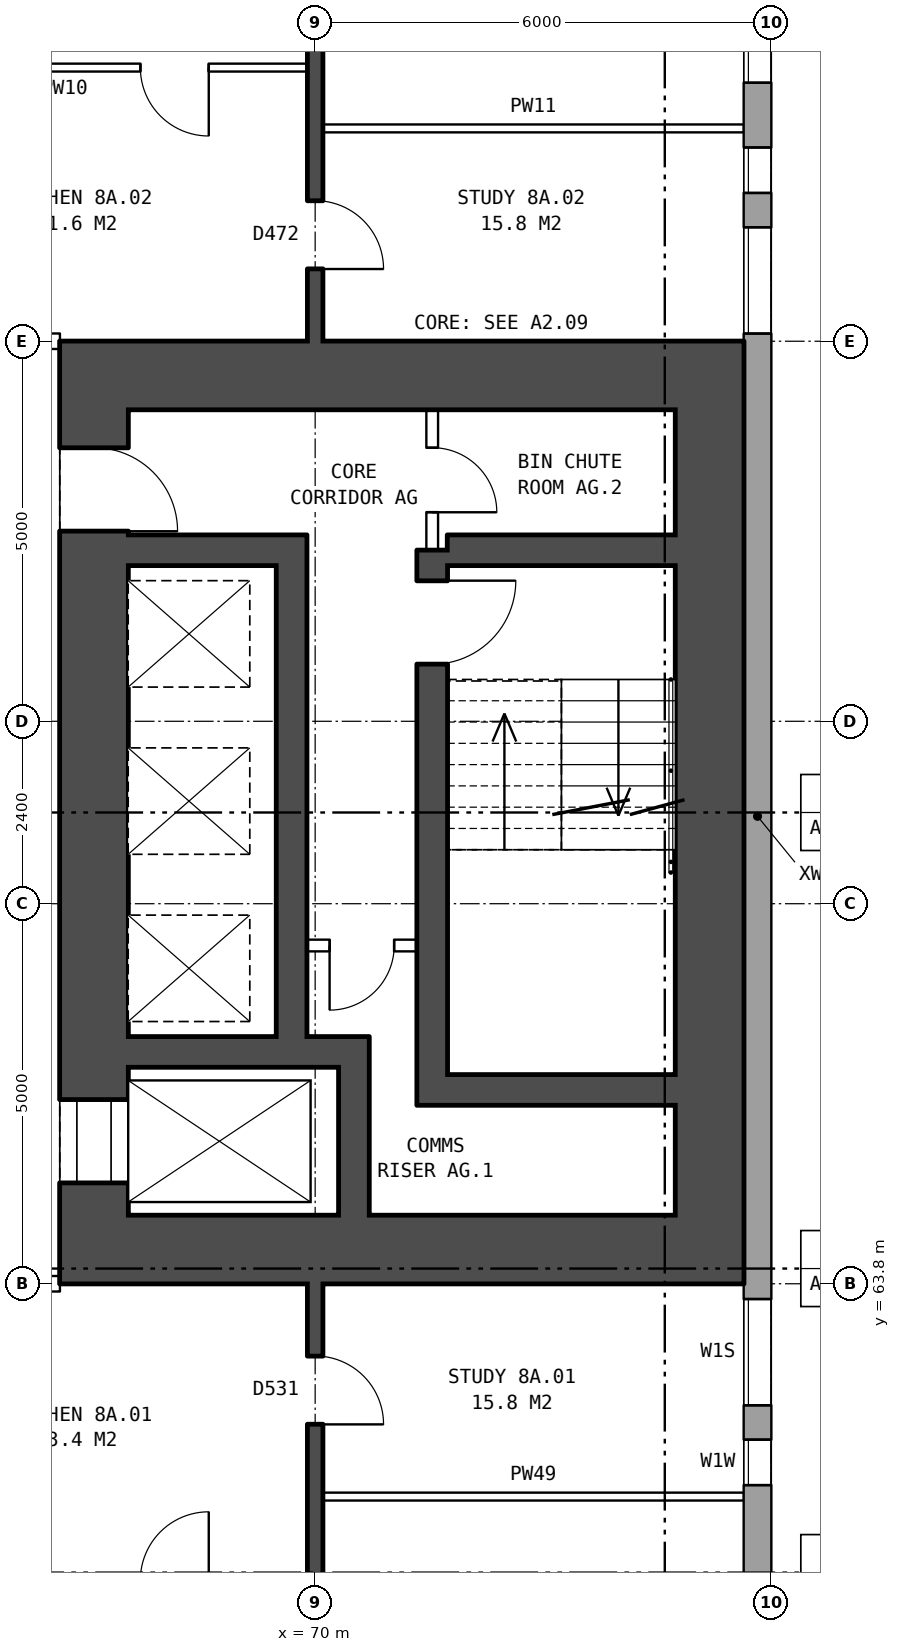
"""IFC4 building model, lengths in metres.
Left out: names, types, materials, properties, quantities, classifications, styles, units other than length and angle.
Written with IfcOpenShell. Run it as: python <this file> out.ifc"""

import sys

from ifc_helpers import new_model, si_unit, direction, frame, frame_2d, origin, place, context, subcontext, project, spatial, rectangle, extrude, element, fill, save


model = new_model("IFC4")
c1 = context("Model", 3, precision=1e-05, world=origin(), true_north=direction((0.0, 1.0)))
c2 = subcontext(c1, "Body", "Model", "MODEL_VIEW")
j1 = project(units=[si_unit("LENGTHUNIT", "METRE"), si_unit("PLANEANGLEUNIT", "RADIAN")], contexts=[c1])
p1 = place(None, origin())
s1 = spatial("IfcSite", under=j1, at=p1, CompositionType="ELEMENT")
p2 = place(p1, origin())
s2 = spatial("IfcBuilding", under=s1, at=p2, CompositionType="ELEMENT")
p3 = place(p2, frame((0.0, 0.0, 31.9)))
s3 = spatial("IfcBuildingStorey", under=s2, at=p3, CompositionType="ELEMENT", Elevation=31.9)
p4 = place(p3, frame((75.82, 57.075, 0.0), z_axis=(0.0, 0.0, 1.0), x_axis=(0.0, 1.0, 0.0)))
e1 = element("IfcWall", 1, at=p4, inside=s3, PredefinedType="STANDARD", context=c2, shape_type="SweptSolid", body=[
    extrude(rectangle(XDim=25.851, YDim=0.36, at=frame_2d((12.925, 0.0))), origin(), (0.0, 0.0, 1.0), 2.85),
])
p5 = place(p4, frame((0.3, 0.0, 0.8)))
e2 = element("IfcOpeningElement", 2, at=p5, cuts=e1, PredefinedType="OPENING", context=c2, shape_type="SweptSolid", body=[
    extrude(rectangle(XDim=1.4, YDim=1.8, at=frame_2d((0.7, 0.9))), frame((0.0, 0.19, 0.0), z_axis=(0.0, -1.0, 0.0), x_axis=(1.0, 0.0, 0.0)), (0.0, 0.0, 1.0), 0.38),
])
p6 = place(p4, frame((4.075, 0.0, 0.25)))
e3 = element("IfcOpeningElement", 3, at=p6, cuts=e1, PredefinedType="OPENING", context=c2, shape_type="SweptSolid", body=[
    extrude(rectangle(XDim=0.6, YDim=0.9, at=frame_2d((0.3, 0.45))), frame((0.0, 0.19, 0.0), z_axis=(0.0, -1.0, 0.0), x_axis=(1.0, 0.0, 0.0)), (0.0, 0.0, 1.0), 0.38),
])
p7 = place(p4, frame((19.225, 0.0, 1.65)))
e4 = element("IfcOpeningElement", 4, at=p7, cuts=e1, PredefinedType="OPENING", context=c2, shape_type="SweptSolid", body=[
    extrude(rectangle(XDim=1.4, YDim=0.9, at=frame_2d((0.7, 0.45))), frame((0.0, 0.19, 0.0), z_axis=(0.0, -1.0, 0.0), x_axis=(1.0, 0.0, 0.0)), (0.0, 0.0, 1.0), 0.38),
])
p8 = place(p4, frame((22.525, 0.0, 0.8)))
e5 = element("IfcOpeningElement", 5, at=p8, cuts=e1, PredefinedType="OPENING", context=c2, shape_type="SweptSolid", body=[
    extrude(rectangle(XDim=1.0, YDim=1.2, at=frame_2d((0.5, 0.6))), frame((0.0, 0.19, 0.0), z_axis=(0.0, -1.0, 0.0), x_axis=(1.0, 0.0, 0.0)), (0.0, 0.0, 1.0), 0.38),
])
p9 = place(p4, frame((2.0, 0.0, 0.8)))
e6 = element("IfcOpeningElement", 6, at=p9, cuts=e1, PredefinedType="OPENING", context=c2, shape_type="SweptSolid", body=[
    extrude(rectangle(XDim=0.8, YDim=1.5, at=frame_2d((0.4, 0.75))), frame((0.0, 0.19, 0.0), z_axis=(0.0, -1.0, 0.0), x_axis=(1.0, 0.0, 0.0)), (0.0, 0.0, 1.0), 0.38),
])
p10 = place(p4, frame((5.125, 0.0, 1.65)))
e7 = element("IfcOpeningElement", 7, at=p10, cuts=e1, PredefinedType="OPENING", context=c2, shape_type="SweptSolid", body=[
    extrude(rectangle(XDim=1.4, YDim=0.9, at=frame_2d((0.7, 0.45))), frame((0.0, 0.19, 0.0), z_axis=(0.0, -1.0, 0.0), x_axis=(1.0, 0.0, 0.0)), (0.0, 0.0, 1.0), 0.38),
])
p11 = place(p4, frame((21.075, 0.0, 0.25)))
e8 = element("IfcOpeningElement", 8, at=p11, cuts=e1, PredefinedType="OPENING", context=c2, shape_type="SweptSolid", body=[
    extrude(rectangle(XDim=0.6, YDim=0.9, at=frame_2d((0.3, 0.45))), frame((0.0, 0.19, 0.0), z_axis=(0.0, -1.0, 0.0), x_axis=(1.0, 0.0, 0.0)), (0.0, 0.0, 1.0), 0.38),
])
p12 = place(p4, frame((23.825, 0.0, 0.8)))
e9 = element("IfcOpeningElement", 9, at=p12, cuts=e1, PredefinedType="OPENING", context=c2, shape_type="SweptSolid", body=[
    extrude(rectangle(XDim=1.4, YDim=1.8, at=frame_2d((0.7, 0.9))), frame((0.0, 0.19, 0.0), z_axis=(0.0, -1.0, 0.0), x_axis=(1.0, 0.0, 0.0)), (0.0, 0.0, 1.0), 0.38),
])
p13 = place(p3, frame((67.09, 64.7, 0.0), z_axis=(0.0, 0.0, 1.0), x_axis=(0.0, 1.0, 0.0)))
e10 = element("IfcWall", 10, at=p13, inside=s3, PredefinedType="SHEAR", context=c2, shape_type="SweptSolid", body=[
    extrude(rectangle(XDim=10.6, YDim=0.9, at=frame_2d((5.3, 0.0))), origin(), (0.0, 0.0, 1.0), 2.85),
])
p14 = place(p13, frame((0.425, 0.0, 0.0)))
e11 = element("IfcOpeningElement", 11, at=p14, cuts=e10, PredefinedType="OPENING", context=c2, shape_type="SweptSolid", body=[
    extrude(rectangle(XDim=1.1, YDim=2.1, at=frame_2d((0.55, 1.05))), frame((0.0, 0.46, 0.0), z_axis=(0.0, -1.0, 0.0), x_axis=(1.0, 0.0, 0.0)), (0.0, 0.0, 1.0), 0.92),
])
p15 = place(p13, frame((9.0, 0.0, 0.0)))
e12 = element("IfcOpeningElement", 12, at=p15, cuts=e10, PredefinedType="OPENING", context=c2, shape_type="SweptSolid", body=[
    extrude(rectangle(XDim=1.1, YDim=2.1, at=frame_2d((0.55, 1.05))), frame((0.0, 0.46, 0.0), z_axis=(0.0, -1.0, 0.0), x_axis=(1.0, 0.0, 0.0)), (0.0, 0.0, 1.0), 0.92),
])
p16 = place(p3, frame((75.19, 64.7, 0.0), z_axis=(0.0, 0.0, 1.0), x_axis=(0.0, 1.0, 0.0)))
e13 = element("IfcWall", 13, at=p16, inside=s3, PredefinedType="SHEAR", context=c2, shape_type="SweptSolid", body=[
    extrude(rectangle(XDim=10.6, YDim=0.9, at=frame_2d((5.3, 0.0))), origin(), (0.0, 0.0, 1.0), 2.85),
])
for number, where, z_axis, x_axis in (
    (14, (66.64, 64.25, 0.0), (0.0, 0.0, 1.0), (1.0, 0.0, 0.0)),
    (15, (66.64, 75.75, 0.0), (0.0, 0.0, 1.0), (1.0, 0.0, 0.0)),
):
    element("IfcWall", number, at=place(p3, frame(where, z_axis=z_axis, x_axis=x_axis)), inside=s3, PredefinedType="SHEAR", context=c2, shape_type="SweptSolid", body=[
        extrude(rectangle(XDim=9.0, YDim=0.9, at=frame_2d((4.5, 0.0))), origin(), (0.0, 0.0, 1.0), 2.85),
    ])
p17 = place(p3, frame((71.74, 66.35, 0.0), z_axis=(0.0, 0.0, 1.0), x_axis=(1.0, 0.0, 0.0)))
e16 = element("IfcWall", 16, at=p17, inside=s3, PredefinedType="SHEAR", context=c2, shape_type="SweptSolid", body=[
    extrude(rectangle(XDim=3.0, YDim=0.4, at=frame_2d((1.5, 0.0))), origin(), (0.0, 0.0, 1.0), 2.85),
])
p18 = place(p3, frame((67.54, 66.85, 0.0), z_axis=(0.0, 0.0, 1.0), x_axis=(1.0, 0.0, 0.0)))
e17 = element("IfcWall", 17, at=p18, inside=s3, PredefinedType="SHEAR", context=c2, shape_type="SweptSolid", body=[
    extrude(rectangle(XDim=3.17, YDim=0.4, at=frame_2d((1.585, 0.0))), origin(), (0.0, 0.0, 1.0), 2.85),
])
p19 = place(p3, frame((69.89, 68.25, 0.0), z_axis=(0.0, 0.0, 1.0), x_axis=(1.0, 0.0, 0.0)))
e18 = element("IfcWall", 18, at=p19, inside=s3, PredefinedType="PARTITIONING", context=c2, shape_type="SweptSolid", body=[
    extrude(rectangle(XDim=1.45, YDim=0.15, at=frame_2d((0.725, 0.0))), origin(), (0.0, 0.0, 1.0), 2.85),
])
p20 = place(p19, frame((0.3, 0.0, 0.0)))
e19 = element("IfcOpeningElement", 19, at=p20, cuts=e18, PredefinedType="OPENING", context=c2, shape_type="SweptSolid", body=[
    extrude(rectangle(XDim=0.85, YDim=2.1, at=frame_2d((0.425, 1.05))), frame((0.0, 0.085, 0.0), z_axis=(0.0, -1.0, 0.0), x_axis=(1.0, 0.0, 0.0)), (0.0, 0.0, 1.0), 0.17),
])
p21 = place(p3, frame((67.54, 73.45, 0.0), z_axis=(0.0, 0.0, 1.0), x_axis=(1.0, 0.0, 0.0)))
e20 = element("IfcWall", 20, at=p21, inside=s3, PredefinedType="SHEAR", context=c2, shape_type="SweptSolid", body=[
    extrude(rectangle(XDim=1.95, YDim=0.4, at=frame_2d((0.975, 0.0))), origin(), (0.0, 0.0, 1.0), 2.85),
])
p22 = place(p3, frame((71.74, 73.45, 0.0), z_axis=(0.0, 0.0, 1.0), x_axis=(1.0, 0.0, 0.0)))
e21 = element("IfcWall", 21, at=p22, inside=s3, PredefinedType="SHEAR", context=c2, shape_type="SweptSolid", body=[
    extrude(rectangle(XDim=3.0, YDim=0.4, at=frame_2d((1.5, 0.0))), origin(), (0.0, 0.0, 1.0), 2.85),
])
p23 = place(p3, frame((69.69, 67.05, 0.0), z_axis=(0.0, 0.0, 1.0), x_axis=(0.0, 1.0, 0.0)))
e22 = element("IfcWall", 22, at=p23, inside=s3, PredefinedType="SHEAR", context=c2, shape_type="SweptSolid", body=[
    extrude(rectangle(XDim=6.6, YDim=0.4, at=frame_2d((3.3, 0.0))), origin(), (0.0, 0.0, 1.0), 2.85),
])
p24 = place(p3, frame((70.51, 64.7, 0.0), z_axis=(0.0, 0.0, 1.0), x_axis=(0.0, 1.0, 0.0)))
e23 = element("IfcWall", 23, at=p24, inside=s3, PredefinedType="SHEAR", context=c2, shape_type="SweptSolid", body=[
    extrude(rectangle(XDim=1.95, YDim=0.4, at=frame_2d((0.975, 0.0))), origin(), (0.0, 0.0, 1.0), 2.85),
])
p25 = place(p3, frame((71.54, 66.15, 0.0), z_axis=(0.0, 0.0, 1.0), x_axis=(0.0, 1.0, 0.0)))
e24 = element("IfcWall", 24, at=p25, inside=s3, PredefinedType="SHEAR", context=c2, shape_type="SweptSolid", body=[
    extrude(rectangle(XDim=7.3, YDim=0.4, at=frame_2d((3.65, 0.0))), origin(), (0.0, 0.0, 1.0), 2.85),
])
p26 = place(p25, frame((5.8, 0.0, 0.0)))
e25 = element("IfcOpeningElement", 25, at=p26, cuts=e24, PredefinedType="OPENING", context=c2, shape_type="SweptSolid", body=[
    extrude(rectangle(XDim=1.1, YDim=2.1, at=frame_2d((0.55, 1.05))), frame((0.0, 0.21, 0.0), z_axis=(0.0, -1.0, 0.0), x_axis=(1.0, 0.0, 0.0)), (0.0, 0.0, 1.0), 0.42),
])
p27 = place(p3, frame((71.54, 73.45, 0.0), z_axis=(0.0, 0.0, 1.0), x_axis=(0.0, 1.0, 0.0)))
e26 = element("IfcWall", 26, at=p27, inside=s3, PredefinedType="PARTITIONING", context=c2, shape_type="SweptSolid", body=[
    extrude(rectangle(XDim=1.85, YDim=0.15, at=frame_2d((0.925, 0.0))), origin(), (0.0, 0.0, 1.0), 2.85),
])
p28 = place(p27, frame((0.5, 0.0, 0.0)))
e27 = element("IfcOpeningElement", 27, at=p28, cuts=e26, PredefinedType="OPENING", context=c2, shape_type="SweptSolid", body=[
    extrude(rectangle(XDim=0.85, YDim=2.1, at=frame_2d((0.425, 1.05))), frame((0.0, 0.085, 0.0), z_axis=(0.0, -1.0, 0.0), x_axis=(1.0, 0.0, 0.0)), (0.0, 0.0, 1.0), 0.17),
])
p29 = place(p3, frame((70.1, 61.0, 0.0), z_axis=(0.0, 0.0, 1.0), x_axis=(1.0, 0.0, 0.0)))
e28 = element("IfcWall", 28, at=p29, inside=s3, PredefinedType="PARTITIONING", context=c2, shape_type="SweptSolid", body=[
    extrude(rectangle(XDim=5.54, YDim=0.1, at=frame_2d((2.77, 0.0))), origin(), (0.0, 0.0, 1.0), 2.85),
])
p30 = place(p3, frame((63.64, 63.8, 0.0), z_axis=(0.0, 0.0, 1.0), x_axis=(1.0, 0.0, 0.0)))
e29 = element("IfcWall", 29, at=p30, inside=s3, PredefinedType="PARTITIONING", context=c2, shape_type="SweptSolid", body=[
    extrude(rectangle(XDim=3.0, YDim=0.2, at=frame_2d((1.5, 0.0))), origin(), (0.0, 0.0, 1.0), 2.85),
])
p31 = place(p30, frame((1.18, 0.0, 0.0)))
e30 = element("IfcOpeningElement", 30, at=p31, cuts=e29, PredefinedType="OPENING", context=c2, shape_type="SweptSolid", body=[
    extrude(rectangle(XDim=1.0, YDim=2.1, at=frame_2d((0.5, 1.05))), frame((0.0, 0.11, 0.0), z_axis=(0.0, -1.0, 0.0), x_axis=(1.0, 0.0, 0.0)), (0.0, 0.0, 1.0), 0.22),
])
p32 = place(p3, frame((63.64, 76.2, 0.0), z_axis=(0.0, 0.0, 1.0), x_axis=(1.0, 0.0, 0.0)))
e31 = element("IfcWall", 31, at=p32, inside=s3, PredefinedType="PARTITIONING", context=c2, shape_type="SweptSolid", body=[
    extrude(rectangle(XDim=3.0, YDim=0.2, at=frame_2d((1.5, 0.0))), origin(), (0.0, 0.0, 1.0), 2.85),
])
p33 = place(p32, frame((1.18, 0.0, 0.0)))
e32 = element("IfcOpeningElement", 32, at=p33, cuts=e31, PredefinedType="OPENING", context=c2, shape_type="SweptSolid", body=[
    extrude(rectangle(XDim=1.0, YDim=2.1, at=frame_2d((0.5, 1.05))), frame((0.0, 0.11, 0.0), z_axis=(0.0, -1.0, 0.0), x_axis=(1.0, 0.0, 0.0)), (0.0, 0.0, 1.0), 0.22),
])
p34 = place(p3, frame((70.1, 79.0, 0.0), z_axis=(0.0, 0.0, 1.0), x_axis=(1.0, 0.0, 0.0)))
e33 = element("IfcWall", 33, at=p34, inside=s3, PredefinedType="PARTITIONING", context=c2, shape_type="SweptSolid", body=[
    extrude(rectangle(XDim=5.54, YDim=0.1, at=frame_2d((2.77, 0.0))), origin(), (0.0, 0.0, 1.0), 2.85),
])
p35 = place(p3, frame((64.1, 79.8, 0.0), z_axis=(0.0, 0.0, 1.0), x_axis=(1.0, 0.0, 0.0)))
e34 = element("IfcWall", 34, at=p35, inside=s3, PredefinedType="PARTITIONING", context=c2, shape_type="SweptSolid", body=[
    extrude(rectangle(XDim=5.8, YDim=0.1, at=frame_2d((2.9, 0.0))), origin(), (0.0, 0.0, 1.0), 2.85),
])
p36 = place(p35, frame((3.6, 0.0, 0.0)))
e35 = element("IfcOpeningElement", 35, at=p36, cuts=e34, PredefinedType="OPENING", context=c2, shape_type="SweptSolid", body=[
    extrude(rectangle(XDim=0.9, YDim=2.1, at=frame_2d((0.45, 1.05))), frame((0.0, 0.06, 0.0), z_axis=(0.0, -1.0, 0.0), x_axis=(1.0, 0.0, 0.0)), (0.0, 0.0, 1.0), 0.12),
])
p37 = place(p35, frame((0.7, 0.0, 0.0)))
e36 = element("IfcOpeningElement", 36, at=p37, cuts=e34, PredefinedType="OPENING", context=c2, shape_type="SweptSolid", body=[
    extrude(rectangle(XDim=0.9, YDim=2.1, at=frame_2d((0.45, 1.05))), frame((0.0, 0.06, 0.0), z_axis=(0.0, -1.0, 0.0), x_axis=(1.0, 0.0, 0.0)), (0.0, 0.0, 1.0), 0.12),
])
p38 = place(p3, frame((70.0, 54.36, 0.0), z_axis=(0.0, 0.0, 1.0), x_axis=(0.0, 1.0, 0.0)))
e37 = element("IfcWall", 37, at=p38, inside=s3, PredefinedType="SOLIDWALL", context=c2, shape_type="SweptSolid", body=[
    extrude(rectangle(XDim=9.44, YDim=0.2, at=frame_2d((4.72, 0.0))), origin(), (0.0, 0.0, 1.0), 2.85),
])
p39 = place(p38, frame((2.32, 0.0, 0.0)))
e38 = element("IfcOpeningElement", 38, at=p39, cuts=e37, PredefinedType="OPENING", context=c2, shape_type="SweptSolid", body=[
    extrude(rectangle(XDim=0.9, YDim=2.1, at=frame_2d((0.45, 1.05))), frame((0.0, 0.11, 0.0), z_axis=(0.0, -1.0, 0.0), x_axis=(1.0, 0.0, 0.0)), (0.0, 0.0, 1.0), 0.22),
])
p40 = place(p38, frame((7.59, 0.0, 0.0)))
e39 = element("IfcOpeningElement", 39, at=p40, cuts=e37, PredefinedType="OPENING", context=c2, shape_type="SweptSolid", body=[
    extrude(rectangle(XDim=0.9, YDim=2.1, at=frame_2d((0.45, 1.05))), frame((0.0, 0.11, 0.0), z_axis=(0.0, -1.0, 0.0), x_axis=(1.0, 0.0, 0.0)), (0.0, 0.0, 1.0), 0.22),
])
p41 = place(p3, frame((70.0, 76.2, 0.0), z_axis=(0.0, 0.0, 1.0), x_axis=(0.0, 1.0, 0.0)))
e40 = element("IfcWall", 40, at=p41, inside=s3, PredefinedType="SOLIDWALL", context=c2, shape_type="SweptSolid", body=[
    extrude(rectangle(XDim=9.44, YDim=0.2, at=frame_2d((4.72, 0.0))), origin(), (0.0, 0.0, 1.0), 2.85),
])
p42 = place(p41, frame((6.07, 0.0, 0.0)))
e41 = element("IfcOpeningElement", 41, at=p42, cuts=e40, PredefinedType="OPENING", context=c2, shape_type="SweptSolid", body=[
    extrude(rectangle(XDim=0.9, YDim=2.1, at=frame_2d((0.45, 1.05))), frame((0.0, 0.11, 0.0), z_axis=(0.0, -1.0, 0.0), x_axis=(1.0, 0.0, 0.0)), (0.0, 0.0, 1.0), 0.22),
])
p43 = place(p41, frame((0.95, 0.0, 0.0)))
e42 = element("IfcOpeningElement", 42, at=p43, cuts=e40, PredefinedType="OPENING", context=c2, shape_type="SweptSolid", body=[
    extrude(rectangle(XDim=0.9, YDim=2.1, at=frame_2d((0.45, 1.05))), frame((0.0, 0.11, 0.0), z_axis=(0.0, -1.0, 0.0), x_axis=(1.0, 0.0, 0.0)), (0.0, 0.0, 1.0), 0.22),
])
p44 = place(p6, origin())
e43 = element("IfcWindow", 43, at=p44, inside=s3, PartitioningType="SINGLE_PANEL", PredefinedType="WINDOW", context=c2, shape_type="SweptSolid", body=[
    extrude(rectangle(XDim=0.6, YDim=0.9, at=frame_2d((0.3, 0.45))), frame((0.0, 0.15, 0.0), z_axis=(0.0, -1.0, 0.0), x_axis=(1.0, 0.0, 0.0)), (0.0, 0.0, 1.0), 0.06),
])
fill(e3, e43)
p45 = place(p7, origin())
e44 = element("IfcWindow", 44, at=p45, inside=s3, PartitioningType="SINGLE_PANEL", PredefinedType="WINDOW", context=c2, shape_type="SweptSolid", body=[
    extrude(rectangle(XDim=1.4, YDim=0.9, at=frame_2d((0.7, 0.45))), frame((0.0, 0.15, 0.0), z_axis=(0.0, -1.0, 0.0), x_axis=(1.0, 0.0, 0.0)), (0.0, 0.0, 1.0), 0.06),
])
fill(e4, e44)
p46 = place(p8, origin())
e45 = element("IfcWindow", 45, at=p46, inside=s3, PartitioningType="SINGLE_PANEL", PredefinedType="WINDOW", context=c2, shape_type="SweptSolid", body=[
    extrude(rectangle(XDim=1.0, YDim=1.2, at=frame_2d((0.5, 0.6))), frame((0.0, 0.15, 0.0), z_axis=(0.0, -1.0, 0.0), x_axis=(1.0, 0.0, 0.0)), (0.0, 0.0, 1.0), 0.06),
])
fill(e5, e45)
p47 = place(p14, origin())
e46 = element("IfcDoor", 46, at=p47, inside=s3, OperationType="DOUBLE_DOOR_SLIDING", PredefinedType="DOOR", context=c2, shape_type="SweptSolid", body=[
    extrude(rectangle(XDim=1.1, YDim=2.1, at=frame_2d((0.55, 1.05))), frame((0.0, -0.385, 0.0), z_axis=(0.0, -1.0, 0.0), x_axis=(1.0, 0.0, 0.0)), (0.0, 0.0, 1.0), 0.05),
])
fill(e11, e46)
p48 = place(p15, frame((1.1, 0.0, 0.0), z_axis=(0.0, 0.0, 1.0), x_axis=(-1.0, 0.0, 0.0)))
e47 = element("IfcDoor", 47, at=p48, inside=s3, OperationType="SINGLE_SWING_RIGHT", PredefinedType="DOOR", context=c2, shape_type="SweptSolid", body=[
    extrude(rectangle(XDim=1.1, YDim=2.1, at=frame_2d((0.55, 1.05))), frame((0.0, 0.435, 0.0), z_axis=(0.0, -1.0, 0.0), x_axis=(1.0, 0.0, 0.0)), (0.0, 0.0, 1.0), 0.05),
])
fill(e12, e47)
p49 = place(p26, frame((1.1, 0.0, 0.0), z_axis=(0.0, 0.0, 1.0), x_axis=(-1.0, 0.0, 0.0)))
e48 = element("IfcDoor", 48, at=p49, inside=s3, OperationType="SINGLE_SWING_LEFT", PredefinedType="DOOR", context=c2, shape_type="SweptSolid", body=[
    extrude(rectangle(XDim=1.1, YDim=2.1, at=frame_2d((0.55, 1.05))), frame((0.0, 0.025, 0.0), z_axis=(0.0, -1.0, 0.0), x_axis=(1.0, 0.0, 0.0)), (0.0, 0.0, 1.0), 0.05),
])
fill(e25, e48)
p50 = place(p20, frame((0.85, 0.0, 0.0), z_axis=(0.0, 0.0, 1.0), x_axis=(-1.0, 0.0, 0.0)))
e49 = element("IfcDoor", 49, at=p50, inside=s3, OperationType="SINGLE_SWING_RIGHT", PredefinedType="DOOR", context=c2, shape_type="SweptSolid", body=[
    extrude(rectangle(XDim=0.85, YDim=2.1, at=frame_2d((0.425, 1.05))), frame((0.0, 0.025, 0.0), z_axis=(0.0, -1.0, 0.0), x_axis=(1.0, 0.0, 0.0)), (0.0, 0.0, 1.0), 0.05),
])
fill(e19, e49)
p51 = place(p28, frame((0.85, 0.0, 0.0), z_axis=(0.0, 0.0, 1.0), x_axis=(-1.0, 0.0, 0.0)))
e50 = element("IfcDoor", 50, at=p51, inside=s3, OperationType="SINGLE_SWING_RIGHT", PredefinedType="DOOR", context=c2, shape_type="SweptSolid", body=[
    extrude(rectangle(XDim=0.85, YDim=2.1, at=frame_2d((0.425, 1.05))), frame((0.0, 0.025, 0.0), z_axis=(0.0, -1.0, 0.0), x_axis=(1.0, 0.0, 0.0)), (0.0, 0.0, 1.0), 0.05),
])
fill(e27, e50)
p52 = place(p40, frame((0.9, 0.0, 0.0), z_axis=(0.0, 0.0, 1.0), x_axis=(-1.0, 0.0, 0.0)))
e51 = element("IfcDoor", 51, at=p52, inside=s3, OperationType="SINGLE_SWING_RIGHT", PredefinedType="DOOR", context=c2, shape_type="SweptSolid", body=[
    extrude(rectangle(XDim=0.9, YDim=2.1, at=frame_2d((0.45, 1.05))), frame((0.0, 0.025, 0.0), z_axis=(0.0, -1.0, 0.0), x_axis=(1.0, 0.0, 0.0)), (0.0, 0.0, 1.0), 0.05),
])
fill(e39, e51)
p53 = place(p43, frame((0.9, 0.0, 0.0), z_axis=(0.0, 0.0, 1.0), x_axis=(-1.0, 0.0, 0.0)))
e52 = element("IfcDoor", 52, at=p53, inside=s3, OperationType="SINGLE_SWING_RIGHT", PredefinedType="DOOR", context=c2, shape_type="SweptSolid", body=[
    extrude(rectangle(XDim=0.9, YDim=2.1, at=frame_2d((0.45, 1.05))), frame((0.0, 0.025, 0.0), z_axis=(0.0, -1.0, 0.0), x_axis=(1.0, 0.0, 0.0)), (0.0, 0.0, 1.0), 0.05),
])
fill(e42, e52)
p54 = place(p36, frame((0.9, 0.0, 0.0), z_axis=(0.0, 0.0, 1.0), x_axis=(-1.0, 0.0, 0.0)))
e53 = element("IfcDoor", 53, at=p54, inside=s3, OperationType="SINGLE_SWING_LEFT", PredefinedType="DOOR", context=c2, shape_type="SweptSolid", body=[
    extrude(rectangle(XDim=0.9, YDim=2.1, at=frame_2d((0.45, 1.05))), frame((0.0, 0.025, 0.0), z_axis=(0.0, -1.0, 0.0), x_axis=(1.0, 0.0, 0.0)), (0.0, 0.0, 1.0), 0.05),
])
fill(e35, e53)
p55 = place(p10, origin())
e54 = element("IfcWindow", 54, at=p55, inside=s3, PartitioningType="SINGLE_PANEL", PredefinedType="WINDOW", context=c2, shape_type="SweptSolid", body=[
    extrude(rectangle(XDim=1.4, YDim=0.9, at=frame_2d((0.7, 0.45))), frame((0.0, 0.15, 0.0), z_axis=(0.0, -1.0, 0.0), x_axis=(1.0, 0.0, 0.0)), (0.0, 0.0, 1.0), 0.06),
])
fill(e7, e54)
p56 = place(p11, origin())
e55 = element("IfcWindow", 55, at=p56, inside=s3, PartitioningType="SINGLE_PANEL", PredefinedType="WINDOW", context=c2, shape_type="SweptSolid", body=[
    extrude(rectangle(XDim=0.6, YDim=0.9, at=frame_2d((0.3, 0.45))), frame((0.0, 0.15, 0.0), z_axis=(0.0, -1.0, 0.0), x_axis=(1.0, 0.0, 0.0)), (0.0, 0.0, 1.0), 0.06),
])
fill(e8, e55)
save(model, sys.argv[1])
